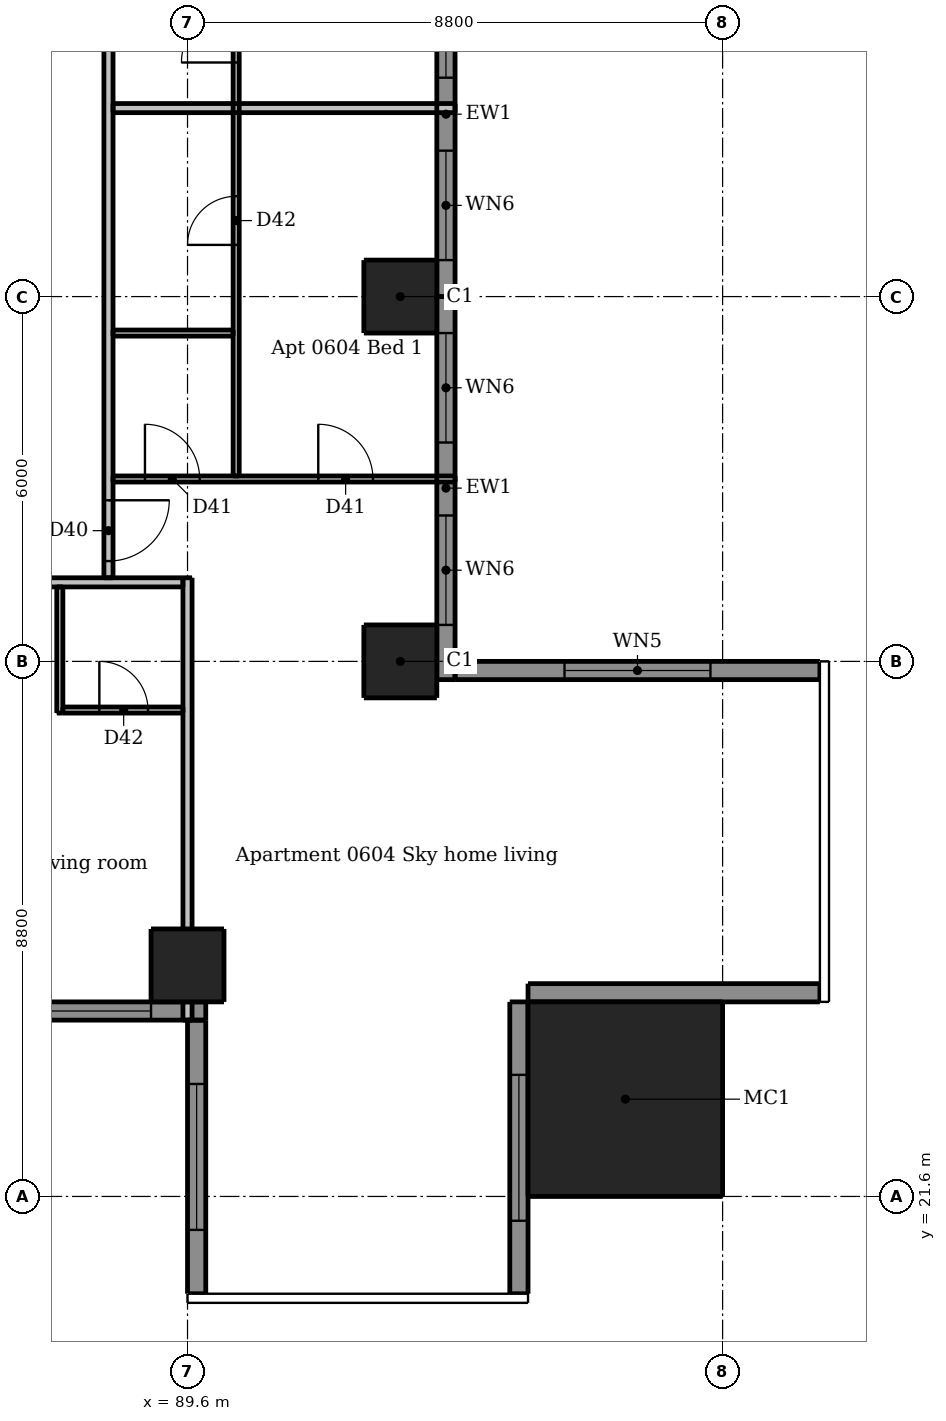
"""IFC4 building model, lengths in metres.
Left out: names, types, materials, properties, quantities, classifications, styles, units other than length and angle.
Written with IfcOpenShell. Run it as: python <this file> out.ifc"""

import sys

from ifc_helpers import new_model, si_unit, direction, frame, frame_2d, origin, origin_2d, place, context, subcontext, project, spatial, rectangle, extrude, element, fill, save


model = new_model("IFC4")
c1 = context("Model", 3, precision=1e-05, world=origin(), true_north=direction((0.0, 1.0)))
c2 = subcontext(c1, "Body", "Model", "MODEL_VIEW")
j1 = project(units=[si_unit("LENGTHUNIT", "METRE"), si_unit("PLANEANGLEUNIT", "RADIAN")], contexts=[c1])
p1 = place(None, origin())
s1 = spatial("IfcSite", under=j1, at=p1, CompositionType="ELEMENT")
p2 = place(p1, origin())
s2 = spatial("IfcBuilding", under=s1, at=p2, CompositionType="ELEMENT")
p3 = place(p2, frame((0.0, 0.0, 26.8)))
s3 = spatial("IfcBuildingStorey", under=s2, at=p3, CompositionType="ELEMENT", Elevation=26.8)
for number, where, z_axis, x_axis in (
    (1, (89.6, 25.4, 0.0), (0.0, 0.0, 1.0), (1.0, 0.0, 0.0)),
    (2, (93.1, 30.4, 0.0), (0.0, 0.0, 1.0), (1.0, 0.0, 0.0)),
    (3, (93.1, 36.4, 0.0), (0.0, 0.0, 1.0), (1.0, 0.0, 0.0)),
):
    element("IfcColumn", number, at=place(p3, frame(where, z_axis=z_axis, x_axis=x_axis)), inside=s3, PredefinedType="COLUMN", context=c2, shape_type="SweptSolid", body=[
        extrude(rectangle(XDim=1.2, YDim=1.2, at=origin_2d()), origin(), (0.0, 0.0, 1.0), 3.05),
    ])
p4 = place(p3, frame((96.8, 23.2, 0.0), z_axis=(0.0, 0.0, 1.0), x_axis=(1.0, 0.0, 0.0)))
e4 = element("IfcColumn", 4, at=p4, inside=s3, PredefinedType="COLUMN", context=c2, shape_type="SweptSolid", body=[
    extrude(rectangle(XDim=3.2, YDim=3.2, at=origin_2d()), origin(), (0.0, 0.0, 1.0), 3.3),
])
p5 = place(p3, frame((89.75, 24.5, 0.0), z_axis=(0.0, 0.0, 1.0), x_axis=(0.0, -1.0, 0.0)))
e5 = element("IfcWall", 5, at=p5, inside=s3, PredefinedType="SOLIDWALL", context=c2, shape_type="SweptSolid", body=[
    extrude(rectangle(XDim=4.5, YDim=0.3, at=frame_2d((2.25, 0.0))), origin(), (0.0, 0.0, 1.0), 3.05),
])
p6 = place(p5, frame((1.05, 0.0, 0.15)))
e6 = element("IfcOpeningElement", 6, at=p6, cuts=e5, PredefinedType="OPENING", context=c2, shape_type="SweptSolid", body=[
    extrude(rectangle(XDim=2.4, YDim=2.1, at=frame_2d((1.2, 1.05))), frame((0.0, 0.16, 0.0), z_axis=(0.0, -1.0, 0.0), x_axis=(1.0, 0.0, 0.0)), (0.0, 0.0, 1.0), 0.32),
])
p7 = place(p3, frame((95.05, 20.0, 0.0), z_axis=(0.0, 0.0, 1.0), x_axis=(0.0, 1.0, 0.0)))
e7 = element("IfcWall", 7, at=p7, inside=s3, PredefinedType="SOLIDWALL", context=c2, shape_type="SweptSolid", body=[
    extrude(rectangle(XDim=4.8, YDim=0.3, at=frame_2d((2.4, 0.0))), origin(), (0.0, 0.0, 1.0), 3.05),
])
p8 = place(p7, frame((1.2, 0.0, 0.15)))
e8 = element("IfcOpeningElement", 8, at=p8, cuts=e7, PredefinedType="OPENING", context=c2, shape_type="SweptSolid", body=[
    extrude(rectangle(XDim=2.4, YDim=2.1, at=frame_2d((1.2, 1.05))), frame((0.0, 0.16, 0.0), z_axis=(0.0, -1.0, 0.0), x_axis=(1.0, 0.0, 0.0)), (0.0, 0.0, 1.0), 0.32),
])
p9 = place(p3, frame((95.2, 24.95, 0.0), z_axis=(0.0, 0.0, 1.0), x_axis=(1.0, 0.0, 0.0)))
e9 = element("IfcWall", 9, at=p9, inside=s3, PredefinedType="SOLIDWALL", context=c2, shape_type="SweptSolid", body=[
    extrude(rectangle(XDim=4.8, YDim=0.3, at=frame_2d((2.4, 0.0))), origin(), (0.0, 0.0, 1.0), 3.05),
])
p10 = place(p3, frame((100.0, 30.25, 0.0), z_axis=(0.0, 0.0, 1.0), x_axis=(-1.0, 0.0, 0.0)))
e10 = element("IfcWall", 10, at=p10, inside=s3, PredefinedType="SOLIDWALL", context=c2, shape_type="SweptSolid", body=[
    extrude(rectangle(XDim=6.0, YDim=0.3, at=frame_2d((3.0, 0.0))), origin(), (0.0, 0.0, 1.0), 3.05),
])
p11 = place(p10, frame((1.8, 0.0, 0.15)))
e11 = element("IfcOpeningElement", 11, at=p11, cuts=e10, PredefinedType="OPENING", context=c2, shape_type="SweptSolid", body=[
    extrude(rectangle(XDim=2.4, YDim=2.1, at=frame_2d((1.2, 1.05))), frame((0.0, 0.16, 0.0), z_axis=(0.0, -1.0, 0.0), x_axis=(1.0, 0.0, 0.0)), (0.0, 0.0, 1.0), 0.32),
])
p12 = place(p3, frame((83.9, 24.65, 0.0), z_axis=(0.0, 0.0, 1.0), x_axis=(1.0, 0.0, 0.0)))
e12 = element("IfcWall", 12, at=p12, inside=s3, PredefinedType="SOLIDWALL", context=c2, shape_type="SweptSolid", body=[
    extrude(rectangle(XDim=6.0, YDim=0.3, at=frame_2d((3.0, 0.0))), origin(), (0.0, 0.0, 1.0), 3.05),
])
p13 = place(p12, frame((0.3, 0.0, 0.15)))
e13 = element("IfcOpeningElement", 13, at=p13, cuts=e12, PredefinedType="OPENING", context=c2, shape_type="SweptSolid", body=[
    extrude(rectangle(XDim=1.8, YDim=2.1, at=frame_2d((0.9, 1.05))), frame((0.0, 0.16, 0.0), z_axis=(0.0, -1.0, 0.0), x_axis=(1.0, 0.0, 0.0)), (0.0, 0.0, 1.0), 0.32),
])
p14 = place(p12, frame((3.3, 0.0, 0.15)))
e14 = element("IfcOpeningElement", 14, at=p14, cuts=e12, PredefinedType="OPENING", context=c2, shape_type="SweptSolid", body=[
    extrude(rectangle(XDim=1.8, YDim=2.1, at=frame_2d((0.9, 1.05))), frame((0.0, 0.16, 0.0), z_axis=(0.0, -1.0, 0.0), x_axis=(1.0, 0.0, 0.0)), (0.0, 0.0, 1.0), 0.32),
])
p15 = place(p3, frame((93.85, 30.1, 0.0), z_axis=(0.0, 0.0, 1.0), x_axis=(0.0, 1.0, 0.0)))
e15 = element("IfcWall", 15, at=p15, inside=s3, PredefinedType="SOLIDWALL", context=c2, shape_type="SweptSolid", body=[
    extrude(rectangle(XDim=6.3, YDim=0.3, at=frame_2d((3.15, 0.0))), origin(), (0.0, 0.0, 1.0), 3.05),
])
p16 = place(p15, frame((0.9, 0.0, 0.15)))
e16 = element("IfcOpeningElement", 16, at=p16, cuts=e15, PredefinedType="OPENING", context=c2, shape_type="SweptSolid", body=[
    extrude(rectangle(XDim=1.8, YDim=2.1, at=frame_2d((0.9, 1.05))), frame((0.0, 0.16, 0.0), z_axis=(0.0, -1.0, 0.0), x_axis=(1.0, 0.0, 0.0)), (0.0, 0.0, 1.0), 0.32),
])
p17 = place(p15, frame((3.9, 0.0, 0.15)))
e17 = element("IfcOpeningElement", 17, at=p17, cuts=e15, PredefinedType="OPENING", context=c2, shape_type="SweptSolid", body=[
    extrude(rectangle(XDim=1.8, YDim=2.1, at=frame_2d((0.9, 1.05))), frame((0.0, 0.16, 0.0), z_axis=(0.0, -1.0, 0.0), x_axis=(1.0, 0.0, 0.0)), (0.0, 0.0, 1.0), 0.32),
])
p18 = place(p3, frame((93.85, 36.4, 0.0), z_axis=(0.0, 0.0, 1.0), x_axis=(0.0, 1.0, 0.0)))
e18 = element("IfcWall", 18, at=p18, inside=s3, PredefinedType="SOLIDWALL", context=c2, shape_type="SweptSolid", body=[
    extrude(rectangle(XDim=6.0, YDim=0.3, at=frame_2d((3.0, 0.0))), origin(), (0.0, 0.0, 1.0), 3.05),
])
p19 = place(p18, frame((0.6, 0.0, 0.15)))
e19 = element("IfcOpeningElement", 19, at=p19, cuts=e18, PredefinedType="OPENING", context=c2, shape_type="SweptSolid", body=[
    extrude(rectangle(XDim=1.8, YDim=2.1, at=frame_2d((0.9, 1.05))), frame((0.0, 0.16, 0.0), z_axis=(0.0, -1.0, 0.0), x_axis=(1.0, 0.0, 0.0)), (0.0, 0.0, 1.0), 0.32),
])
p20 = place(p18, frame((3.6, 0.0, 0.15)))
e20 = element("IfcOpeningElement", 20, at=p20, cuts=e18, PredefinedType="OPENING", context=c2, shape_type="SweptSolid", body=[
    extrude(rectangle(XDim=1.8, YDim=2.1, at=frame_2d((0.9, 1.05))), frame((0.0, 0.16, 0.0), z_axis=(0.0, -1.0, 0.0), x_axis=(1.0, 0.0, 0.0)), (0.0, 0.0, 1.0), 0.32),
])
p21 = place(p3, frame((87.5, 29.55, 0.0), z_axis=(0.0, 0.0, 1.0), x_axis=(0.0, 1.0, 0.0)))
e21 = element("IfcWall", 21, at=p21, inside=s3, PredefinedType="PARTITIONING", context=c2, shape_type="SweptSolid", body=[
    extrude(rectangle(XDim=2.075, YDim=0.1, at=frame_2d((1.038, 0.0))), origin(), (0.0, 0.0, 1.0), 3.05),
])
p22 = place(p3, frame((90.4, 33.45, 0.0), z_axis=(0.0, 0.0, 1.0), x_axis=(0.0, 1.0, 0.0)))
e22 = element("IfcWall", 22, at=p22, inside=s3, PredefinedType="PARTITIONING", context=c2, shape_type="SweptSolid", body=[
    extrude(rectangle(XDim=8.5, YDim=0.1, at=frame_2d((4.25, 0.0))), origin(), (0.0, 0.0, 1.0), 3.05),
])
p23 = place(p22, frame((3.8, 0.0, 0.0)))
e23 = element("IfcOpeningElement", 23, at=p23, cuts=e22, PredefinedType="OPENING", context=c2, shape_type="SweptSolid", body=[
    extrude(rectangle(XDim=0.8, YDim=2.1, at=frame_2d((0.4, 1.05))), frame((0.0, 0.06, 0.0), z_axis=(0.0, -1.0, 0.0), x_axis=(1.0, 0.0, 0.0)), (0.0, 0.0, 1.0), 0.12),
])
p24 = place(p22, frame((6.8, 0.0, 0.0)))
e24 = element("IfcOpeningElement", 24, at=p24, cuts=e22, PredefinedType="OPENING", context=c2, shape_type="SweptSolid", body=[
    extrude(rectangle(XDim=0.9, YDim=2.1, at=frame_2d((0.45, 1.05))), frame((0.0, 0.06, 0.0), z_axis=(0.0, -1.0, 0.0), x_axis=(1.0, 0.0, 0.0)), (0.0, 0.0, 1.0), 0.12),
])
p25 = place(p3, frame((88.375, 35.8, 0.0), z_axis=(0.0, 0.0, 1.0), x_axis=(1.0, 0.0, 0.0)))
e25 = element("IfcWall", 25, at=p25, inside=s3, PredefinedType="PARTITIONING", context=c2, shape_type="SweptSolid", body=[
    extrude(rectangle(XDim=1.975, YDim=0.1, at=frame_2d((0.988, 0.0))), origin(), (0.0, 0.0, 1.0), 3.05),
])
p26 = place(p3, frame((88.375, 33.4, 0.0), z_axis=(0.0, 0.0, 1.0), x_axis=(1.0, 0.0, 0.0)))
e26 = element("IfcWall", 26, at=p26, inside=s3, PredefinedType="PARTITIONING", context=c2, shape_type="SweptSolid", body=[
    extrude(rectangle(XDim=5.625, YDim=0.1, at=frame_2d((2.812, 0.0))), origin(), (0.0, 0.0, 1.0), 3.05),
])
p27 = place(p26, frame((0.525, 0.0, 0.0)))
e27 = element("IfcOpeningElement", 27, at=p27, cuts=e26, PredefinedType="OPENING", context=c2, shape_type="SweptSolid", body=[
    extrude(rectangle(XDim=0.9, YDim=2.1, at=frame_2d((0.45, 1.05))), frame((0.0, 0.06, 0.0), z_axis=(0.0, -1.0, 0.0), x_axis=(1.0, 0.0, 0.0)), (0.0, 0.0, 1.0), 0.12),
])
p28 = place(p26, frame((3.375, 0.0, 0.0)))
e28 = element("IfcOpeningElement", 28, at=p28, cuts=e26, PredefinedType="OPENING", context=c2, shape_type="SweptSolid", body=[
    extrude(rectangle(XDim=0.9, YDim=2.1, at=frame_2d((0.45, 1.05))), frame((0.0, 0.06, 0.0), z_axis=(0.0, -1.0, 0.0), x_axis=(1.0, 0.0, 0.0)), (0.0, 0.0, 1.0), 0.12),
])
p29 = place(p3, frame((87.55, 29.6, 0.0), z_axis=(0.0, 0.0, 1.0), x_axis=(1.0, 0.0, 0.0)))
e29 = element("IfcWall", 29, at=p29, inside=s3, PredefinedType="PARTITIONING", context=c2, shape_type="SweptSolid", body=[
    extrude(rectangle(XDim=1.975, YDim=0.1, at=frame_2d((0.987, 0.0))), origin(), (0.0, 0.0, 1.0), 3.05),
])
p30 = place(p29, frame((0.6, 0.0, 0.0)))
e30 = element("IfcOpeningElement", 30, at=p30, cuts=e29, PredefinedType="OPENING", context=c2, shape_type="SweptSolid", body=[
    extrude(rectangle(XDim=0.8, YDim=2.1, at=frame_2d((0.4, 1.05))), frame((0.0, 0.06, 0.0), z_axis=(0.0, -1.0, 0.0), x_axis=(1.0, 0.0, 0.0)), (0.0, 0.0, 1.0), 0.12),
])
p31 = place(p3, frame((88.3, 60.475, 0.0), z_axis=(0.0, 0.0, 1.0), x_axis=(0.0, -1.0, 0.0)))
e31 = element("IfcWall", 31, at=p31, inside=s3, PredefinedType="PARTITIONING", context=c2, shape_type="SweptSolid", body=[
    extrude(rectangle(XDim=28.7, YDim=0.15, at=frame_2d((14.35, 0.0))), origin(), (0.0, 0.0, 1.0), 3.05),
])
p32 = place(p31, frame((27.425, 0.0, 0.0)))
e32 = element("IfcOpeningElement", 32, at=p32, cuts=e31, PredefinedType="OPENING", context=c2, shape_type="SweptSolid", body=[
    extrude(rectangle(XDim=1.0, YDim=2.1, at=frame_2d((0.5, 1.05))), frame((0.0, 0.085, 0.0), z_axis=(0.0, -1.0, 0.0), x_axis=(1.0, 0.0, 0.0)), (0.0, 0.0, 1.0), 0.17),
])
p33 = place(p31, frame((16.325, 0.0, 0.0)))
e33 = element("IfcOpeningElement", 33, at=p33, cuts=e31, PredefinedType="OPENING", context=c2, shape_type="SweptSolid", body=[
    extrude(rectangle(XDim=1.0, YDim=2.1, at=frame_2d((0.5, 1.05))), frame((0.0, 0.085, 0.0), z_axis=(0.0, -1.0, 0.0), x_axis=(1.0, 0.0, 0.0)), (0.0, 0.0, 1.0), 0.17),
])
p34 = place(p31, frame((5.525, 0.0, 0.0)))
e34 = element("IfcOpeningElement", 34, at=p34, cuts=e31, PredefinedType="OPENING", context=c2, shape_type="SweptSolid", body=[
    extrude(rectangle(XDim=1.0, YDim=2.1, at=frame_2d((0.5, 1.05))), frame((0.0, 0.085, 0.0), z_axis=(0.0, -1.0, 0.0), x_axis=(1.0, 0.0, 0.0)), (0.0, 0.0, 1.0), 0.17),
])
p35 = place(p3, frame((89.6, 24.5, 0.0), z_axis=(0.0, 0.0, 1.0), x_axis=(0.0, 1.0, 0.0)))
e35 = element("IfcWall", 35, at=p35, inside=s3, PredefinedType="PARTITIONING", context=c2, shape_type="SweptSolid", body=[
    extrude(rectangle(XDim=7.275, YDim=0.15, at=frame_2d((3.637, 0.0))), origin(), (0.0, 0.0, 1.0), 2.516),
])
p36 = place(p3, frame((88.375, 39.5, 0.0), z_axis=(0.0, 0.0, 1.0), x_axis=(1.0, 0.0, 0.0)))
e36 = element("IfcWall", 36, at=p36, inside=s3, PredefinedType="PARTITIONING", context=c2, shape_type="SweptSolid", body=[
    extrude(rectangle(XDim=5.625, YDim=0.15, at=frame_2d((2.812, 0.0))), origin(), (0.0, 0.0, 1.0), 3.05),
])
p37 = place(p3, frame((89.525, 31.7, 0.0), z_axis=(0.0, 0.0, 1.0), x_axis=(-1.0, 0.0, 0.0)))
e37 = element("IfcWall", 37, at=p37, inside=s3, PredefinedType="PARTITIONING", context=c2, shape_type="SweptSolid", body=[
    extrude(rectangle(XDim=28.75, YDim=0.15, at=frame_2d((14.375, 0.0))), origin(), (0.0, 0.0, 1.0), 3.05),
])
p38 = place(p37, frame((24.625, 0.0, 0.0)))
e38 = element("IfcOpeningElement", 38, at=p38, cuts=e37, PredefinedType="OPENING", context=c2, shape_type="SweptSolid", body=[
    extrude(rectangle(XDim=1.0, YDim=2.1, at=frame_2d((0.5, 1.05))), frame((0.0, 0.085, 0.0), z_axis=(0.0, -1.0, 0.0), x_axis=(1.0, 0.0, 0.0)), (0.0, 0.0, 1.0), 0.17),
])
p39 = place(p37, frame((10.225, 0.0, 0.0)))
e39 = element("IfcOpeningElement", 39, at=p39, cuts=e37, PredefinedType="OPENING", context=c2, shape_type="SweptSolid", body=[
    extrude(rectangle(XDim=1.0, YDim=2.1, at=frame_2d((0.5, 1.05))), frame((0.0, 0.085, 0.0), z_axis=(0.0, -1.0, 0.0), x_axis=(1.0, 0.0, 0.0)), (0.0, 0.0, 1.0), 0.17),
])
p40 = place(p37, frame((2.425, 0.0, 0.0)))
e40 = element("IfcOpeningElement", 40, at=p40, cuts=e37, PredefinedType="OPENING", context=c2, shape_type="SweptSolid", body=[
    extrude(rectangle(XDim=1.0, YDim=2.1, at=frame_2d((0.5, 1.05))), frame((0.0, 0.085, 0.0), z_axis=(0.0, -1.0, 0.0), x_axis=(1.0, 0.0, 0.0)), (0.0, 0.0, 1.0), 0.17),
])
p41 = place(p6, origin())
e41 = element("IfcWindow", 41, at=p41, inside=s3, PartitioningType="DOUBLE_PANEL_VERTICAL", PredefinedType="WINDOW", context=c2, shape_type="SweptSolid", body=[
    extrude(rectangle(XDim=2.4, YDim=2.1, at=frame_2d((1.2, 1.05))), frame((0.0, 0.03, 0.0), z_axis=(0.0, -1.0, 0.0), x_axis=(1.0, 0.0, 0.0)), (0.0, 0.0, 1.0), 0.06),
])
fill(e6, e41)
p42 = place(p8, origin())
e42 = element("IfcWindow", 42, at=p42, inside=s3, PartitioningType="DOUBLE_PANEL_VERTICAL", PredefinedType="WINDOW", context=c2, shape_type="SweptSolid", body=[
    extrude(rectangle(XDim=2.4, YDim=2.1, at=frame_2d((1.2, 1.05))), frame((0.0, 0.03, 0.0), z_axis=(0.0, -1.0, 0.0), x_axis=(1.0, 0.0, 0.0)), (0.0, 0.0, 1.0), 0.06),
])
fill(e8, e42)
p43 = place(p11, origin())
e43 = element("IfcWindow", 43, at=p43, inside=s3, PartitioningType="DOUBLE_PANEL_VERTICAL", PredefinedType="WINDOW", context=c2, shape_type="SweptSolid", body=[
    extrude(rectangle(XDim=2.4, YDim=2.1, at=frame_2d((1.2, 1.05))), frame((0.0, 0.03, 0.0), z_axis=(0.0, -1.0, 0.0), x_axis=(1.0, 0.0, 0.0)), (0.0, 0.0, 1.0), 0.06),
])
fill(e11, e43)
p44 = place(p14, origin())
e44 = element("IfcWindow", 44, at=p44, inside=s3, PartitioningType="DOUBLE_PANEL_VERTICAL", PredefinedType="WINDOW", context=c2, shape_type="SweptSolid", body=[
    extrude(rectangle(XDim=1.8, YDim=2.1, at=frame_2d((0.9, 1.05))), frame((0.0, 0.03, 0.0), z_axis=(0.0, -1.0, 0.0), x_axis=(1.0, 0.0, 0.0)), (0.0, 0.0, 1.0), 0.06),
])
fill(e14, e44)
p45 = place(p16, origin())
e45 = element("IfcWindow", 45, at=p45, inside=s3, PartitioningType="DOUBLE_PANEL_VERTICAL", PredefinedType="WINDOW", context=c2, shape_type="SweptSolid", body=[
    extrude(rectangle(XDim=1.8, YDim=2.1, at=frame_2d((0.9, 1.05))), frame((0.0, 0.03, 0.0), z_axis=(0.0, -1.0, 0.0), x_axis=(1.0, 0.0, 0.0)), (0.0, 0.0, 1.0), 0.06),
])
fill(e16, e45)
p46 = place(p17, origin())
e46 = element("IfcWindow", 46, at=p46, inside=s3, PartitioningType="DOUBLE_PANEL_VERTICAL", PredefinedType="WINDOW", context=c2, shape_type="SweptSolid", body=[
    extrude(rectangle(XDim=1.8, YDim=2.1, at=frame_2d((0.9, 1.05))), frame((0.0, 0.03, 0.0), z_axis=(0.0, -1.0, 0.0), x_axis=(1.0, 0.0, 0.0)), (0.0, 0.0, 1.0), 0.06),
])
fill(e17, e46)
p47 = place(p19, origin())
e47 = element("IfcWindow", 47, at=p47, inside=s3, PartitioningType="DOUBLE_PANEL_VERTICAL", PredefinedType="WINDOW", context=c2, shape_type="SweptSolid", body=[
    extrude(rectangle(XDim=1.8, YDim=2.1, at=frame_2d((0.9, 1.05))), frame((0.0, 0.03, 0.0), z_axis=(0.0, -1.0, 0.0), x_axis=(1.0, 0.0, 0.0)), (0.0, 0.0, 1.0), 0.06),
])
fill(e19, e47)
p48 = place(p20, origin())
e48 = element("IfcWindow", 48, at=p48, inside=s3, PartitioningType="DOUBLE_PANEL_VERTICAL", PredefinedType="WINDOW", context=c2, shape_type="SweptSolid", body=[
    extrude(rectangle(XDim=1.8, YDim=2.1, at=frame_2d((0.9, 1.05))), frame((0.0, 0.03, 0.0), z_axis=(0.0, -1.0, 0.0), x_axis=(1.0, 0.0, 0.0)), (0.0, 0.0, 1.0), 0.06),
])
fill(e20, e48)
p49 = place(p30, origin())
e49 = element("IfcDoor", 49, at=p49, inside=s3, OperationType="SINGLE_SWING_LEFT", PredefinedType="DOOR", context=c2, shape_type="SweptSolid", body=[
    extrude(rectangle(XDim=0.8, YDim=2.1, at=frame_2d((0.4, 1.05))), frame((0.0, 0.025, 0.0), z_axis=(0.0, -1.0, 0.0), x_axis=(1.0, 0.0, 0.0)), (0.0, 0.0, 1.0), 0.05),
])
fill(e30, e49)
p50 = place(p32, origin())
e50 = element("IfcDoor", 50, at=p50, inside=s3, OperationType="SINGLE_SWING_LEFT", PredefinedType="DOOR", context=c2, shape_type="SweptSolid", body=[
    extrude(rectangle(XDim=1.0, YDim=2.1, at=frame_2d((0.5, 1.05))), frame((0.0, 0.025, 0.0), z_axis=(0.0, -1.0, 0.0), x_axis=(1.0, 0.0, 0.0)), (0.0, 0.0, 1.0), 0.05),
])
fill(e32, e50)
p51 = place(p27, origin())
e51 = element("IfcDoor", 51, at=p51, inside=s3, OperationType="SINGLE_SWING_LEFT", PredefinedType="DOOR", context=c2, shape_type="SweptSolid", body=[
    extrude(rectangle(XDim=0.9, YDim=2.1, at=frame_2d((0.45, 1.05))), frame((0.0, 0.025, 0.0), z_axis=(0.0, -1.0, 0.0), x_axis=(1.0, 0.0, 0.0)), (0.0, 0.0, 1.0), 0.05),
])
fill(e27, e51)
p52 = place(p28, origin())
e52 = element("IfcDoor", 52, at=p52, inside=s3, OperationType="SINGLE_SWING_LEFT", PredefinedType="DOOR", context=c2, shape_type="SweptSolid", body=[
    extrude(rectangle(XDim=0.9, YDim=2.1, at=frame_2d((0.45, 1.05))), frame((0.0, 0.025, 0.0), z_axis=(0.0, -1.0, 0.0), x_axis=(1.0, 0.0, 0.0)), (0.0, 0.0, 1.0), 0.05),
])
fill(e28, e52)
p53 = place(p23, origin())
e53 = element("IfcDoor", 53, at=p53, inside=s3, OperationType="SINGLE_SWING_LEFT", PredefinedType="DOOR", context=c2, shape_type="SweptSolid", body=[
    extrude(rectangle(XDim=0.8, YDim=2.1, at=frame_2d((0.4, 1.05))), frame((0.0, 0.025, 0.0), z_axis=(0.0, -1.0, 0.0), x_axis=(1.0, 0.0, 0.0)), (0.0, 0.0, 1.0), 0.05),
])
fill(e23, e53)
p54 = place(p24, origin())
e54 = element("IfcDoor", 54, at=p54, inside=s3, OperationType="SINGLE_SWING_LEFT", PredefinedType="DOOR", context=c2, shape_type="SweptSolid", body=[
    extrude(rectangle(XDim=0.9, YDim=2.1, at=frame_2d((0.45, 1.05))), frame((0.0, 0.025, 0.0), z_axis=(0.0, -1.0, 0.0), x_axis=(1.0, 0.0, 0.0)), (0.0, 0.0, 1.0), 0.05),
])
fill(e24, e54)
save(model, sys.argv[1])
